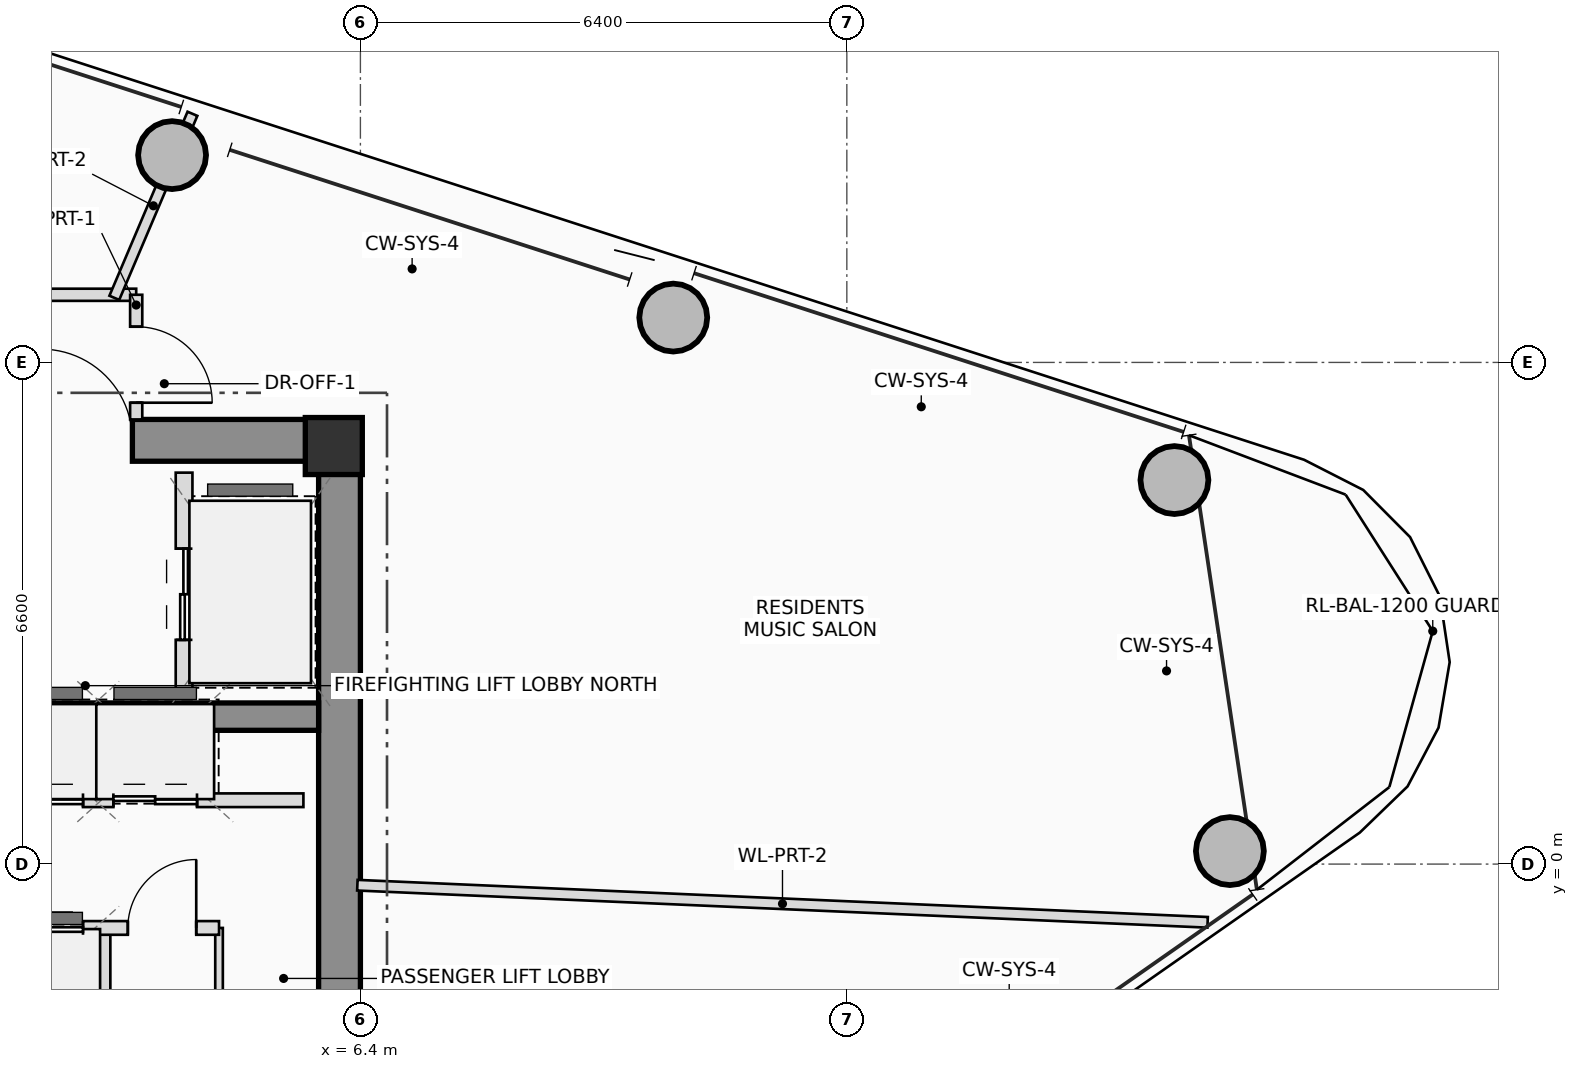
"""IFC4 building model, lengths in metres.
Left out: names, types, materials, properties, quantities, classifications, styles, units other than length and angle.
Written with IfcOpenShell. Run it as: python <this file> out.ifc"""

import sys

from ifc_helpers import new_model, si_unit, direction, frame, frame_2d, origin, origin_2d, place, context, subcontext, project, spatial, rectangle, hollow_circle, extrude, source, transform, mapped, element, fill, save


model = new_model("IFC4")
c1 = context("Model", 3, precision=1e-05, world=origin(), true_north=direction((0.0, 1.0)))
c2 = subcontext(c1, "Body", "Model", "MODEL_VIEW")
j1 = project(units=[si_unit("LENGTHUNIT", "METRE"), si_unit("PLANEANGLEUNIT", "RADIAN")], contexts=[c1])
p1 = place(None, origin())
s1 = spatial("IfcSite", under=j1, at=p1, CompositionType="ELEMENT")
p2 = place(p1, origin())
s2 = spatial("IfcBuilding", under=s1, at=p2, CompositionType="ELEMENT")
p3 = place(p2, frame((0.0, 0.0, 274.55)))
s3 = spatial("IfcBuildingStorey", under=s2, at=p3, CompositionType="ELEMENT", Elevation=274.55)
m1 = source(origin(), c2, "Body", "SweptSolid", [
    extrude(rectangle(XDim=0.75, YDim=0.75, at=origin_2d()), origin(), (0.0, 0.0, 1.0), 3.4),
])
p4 = place(p3, frame((6.05, 5.5, 0.0), z_axis=(0.0, 0.0, 1.0), x_axis=(1.0, 0.0, 0.0)))
e1 = element("IfcColumn", 1, at=p4, inside=s3, PredefinedType="COLUMN", context=c2, shape_type="MappedRepresentation", body=[
    mapped(m1, transform((0.0, 0.0, 0.0), scale=1.0)),
])
p5 = place(p3, frame((-6.4, 5.575, 0.0), z_axis=(0.0, 0.0, 1.0), x_axis=(1.0, 0.0, 0.0)))
e2 = element("IfcWall", 2, at=p5, inside=s3, PredefinedType="SHEAR", context=c2, shape_type="SweptSolid", body=[
    extrude(rectangle(XDim=12.8, YDim=0.55, at=frame_2d((6.4, 0.0))), origin(), (0.0, 0.0, 1.0), 3.4),
])
p6 = place(p5, frame((8.6, 0.0, 0.0)))
e3 = element("IfcOpeningElement", 3, at=p6, cuts=e2, PredefinedType="OPENING", context=c2, shape_type="SweptSolid", body=[
    extrude(rectangle(XDim=1.2, YDim=2.2, at=frame_2d((0.6, 1.1))), frame((0.0, 0.285, 0.0), z_axis=(0.0, -1.0, 0.0), x_axis=(1.0, 0.0, 0.0)), (0.0, 0.0, 1.0), 0.57),
])
p7 = place(p3, frame((6.125, -5.3, 0.0), z_axis=(0.0, 0.0, 1.0), x_axis=(0.0, 1.0, 0.0)))
e4 = element("IfcWall", 4, at=p7, inside=s3, PredefinedType="SHEAR", context=c2, shape_type="SweptSolid", body=[
    extrude(rectangle(XDim=10.6, YDim=0.55, at=frame_2d((5.3, 0.0))), origin(), (0.0, 0.0, 1.0), 3.4),
])
p8 = place(p3, frame((-5.85, 1.94, 0.0), z_axis=(0.0, 0.0, 1.0), x_axis=(1.0, 0.0, 0.0)))
e5 = element("IfcWall", 5, at=p8, inside=s3, PredefinedType="SHEAR", context=c2, shape_type="SweptSolid", body=[
    extrude(rectangle(XDim=11.7, YDim=0.36, at=frame_2d((5.85, 0.0))), origin(), (0.0, 0.0, 1.0), 3.4),
])
m2 = source(origin(), c2, "Body", "SweptSolid", [
    extrude(hollow_circle(Radius=0.45, WallThickness=0.032, at=origin_2d()), origin(), (0.0, 0.0, 1.0), 3.4),
])
for number, where, z_axis, x_axis in (
    (6, (17.84, 0.171, 0.0), (0.0, 0.0, 1.0), (1.0, 0.0, 0.0)),
    (7, (17.11, 5.052, 0.0), (0.0, 0.0, 1.0), (1.0, 0.0, 0.0)),
    (8, (10.516, 7.19, 0.0), (0.0, 0.0, 1.0), (1.0, 0.0, 0.0)),
    (9, (3.922, 9.327, 0.0), (0.0, 0.0, 1.0), (1.0, 0.0, 0.0)),
):
    element("IfcColumn", number, at=place(p3, frame(where, z_axis=z_axis, x_axis=x_axis)), inside=s3, PredefinedType="COLUMN", context=c2, shape_type="MappedRepresentation", body=[
        mapped(m2, transform((0.0, 0.0, 0.0), scale=1.0)),
    ])
p9 = place(p3, frame((4.08, 2.2, 0.0), z_axis=(0.0, 0.0, 1.0), x_axis=(0.0, 1.0, 0.0)))
e10 = element("IfcWall", 10, at=p9, inside=s3, PredefinedType="PLUMBINGWALL", context=c2, shape_type="SweptSolid", body=[
    extrude(rectangle(XDim=2.95, YDim=0.22, at=frame_2d((1.475, 0.0))), origin(), (0.0, 0.0, 1.0), 3.2),
])
p10 = place(p9, frame((0.75, 0.0, 0.0)))
e11 = element("IfcOpeningElement", 11, at=p10, cuts=e10, PredefinedType="OPENING", context=c2, shape_type="SweptSolid", body=[
    extrude(rectangle(XDim=1.2, YDim=2.25, at=frame_2d((0.6, 1.125))), frame((0.0, 0.12, 0.0), z_axis=(0.0, -1.0, 0.0), x_axis=(1.0, 0.0, 0.0)), (0.0, 0.0, 1.0), 0.24),
])
for number, where, z_axis, x_axis in (
    (12, (3.02, 0.84, 0.0), (0.0, 0.0, 1.0), (0.0, 1.0, 0.0)),
    (13, (4.38, 0.84, 0.0), (0.0, 0.0, 1.0), (0.0, 1.0, 0.0)),
    (14, (3.02, -1.82, 0.0), (0.0, 0.0, 1.0), (0.0, 1.0, 0.0)),
):
    element("IfcWall", number, at=place(p3, frame(where, z_axis=z_axis, x_axis=x_axis)), inside=s3, PredefinedType="PLUMBINGWALL", context=c2, shape_type="SweptSolid", body=[
        extrude(rectangle(XDim=0.98, YDim=0.18, at=frame_2d((0.49, 0.0))), origin(), (0.0, 0.0, 1.0), 3.2),
    ])
p11 = place(p3, frame((4.54, -1.82, 0.0), z_axis=(0.0, 0.0, 1.0), x_axis=(0.0, 1.0, 0.0)))
e15 = element("IfcWall", 15, at=p11, inside=s3, PredefinedType="PARTITIONING", context=c2, shape_type="SweptSolid", body=[
    extrude(rectangle(XDim=0.98, YDim=0.1, at=frame_2d((0.49, 0.0))), origin(), (0.0, 0.0, 1.0), 3.2),
])
p12 = place(p3, frame((-5.68, 0.84, 0.0), z_axis=(0.0, 0.0, 1.0), x_axis=(1.0, 0.0, 0.0)))
e16 = element("IfcWall", 16, at=p12, inside=s3, PredefinedType="PLUMBINGWALL", context=c2, shape_type="SweptSolid", body=[
    extrude(rectangle(XDim=11.33, YDim=0.18, at=frame_2d((5.665, 0.0))), origin(), (0.0, 0.0, 1.0), 3.2),
])
p13 = place(p12, frame((3.13, 0.0, 0.0)))
e17 = element("IfcOpeningElement", 17, at=p13, cuts=e16, PredefinedType="OPENING", context=c2, shape_type="SweptSolid", body=[
    extrude(rectangle(XDim=0.9, YDim=2.05, at=frame_2d((0.45, 1.025))), frame((0.0, 0.1, 0.0), z_axis=(0.0, -1.0, 0.0), x_axis=(1.0, 0.0, 0.0)), (0.0, 0.0, 1.0), 0.2),
])
p14 = place(p12, frame((7.33, 0.0, 0.0)))
e18 = element("IfcOpeningElement", 18, at=p14, cuts=e16, PredefinedType="OPENING", context=c2, shape_type="SweptSolid", body=[
    extrude(rectangle(XDim=1.1, YDim=2.2, at=frame_2d((0.55, 1.1))), frame((0.0, 0.1, 0.0), z_axis=(0.0, -1.0, 0.0), x_axis=(1.0, 0.0, 0.0)), (0.0, 0.0, 1.0), 0.2),
])
p15 = place(p12, frame((8.83, 0.0, 0.0)))
e19 = element("IfcOpeningElement", 19, at=p15, cuts=e16, PredefinedType="OPENING", context=c2, shape_type="SweptSolid", body=[
    extrude(rectangle(XDim=1.1, YDim=2.2, at=frame_2d((0.55, 1.1))), frame((0.0, 0.1, 0.0), z_axis=(0.0, -1.0, 0.0), x_axis=(1.0, 0.0, 0.0)), (0.0, 0.0, 1.0), 0.2),
])
p16 = place(p3, frame((-5.68, -0.84, 0.0), z_axis=(0.0, 0.0, 1.0), x_axis=(1.0, 0.0, 0.0)))
e20 = element("IfcWall", 20, at=p16, inside=s3, PredefinedType="PLUMBINGWALL", context=c2, shape_type="SweptSolid", body=[
    extrude(rectangle(XDim=10.22, YDim=0.18, at=frame_2d((5.11, 0.0))), origin(), (0.0, 0.0, 1.0), 3.2),
])
p17 = place(p16, frame((1.88, 0.0, 0.0)))
e21 = element("IfcOpeningElement", 21, at=p17, cuts=e20, PredefinedType="OPENING", context=c2, shape_type="SweptSolid", body=[
    extrude(rectangle(XDim=0.9, YDim=2.05, at=frame_2d((0.45, 1.025))), frame((0.0, 0.1, 0.0), z_axis=(0.0, -1.0, 0.0), x_axis=(1.0, 0.0, 0.0)), (0.0, 0.0, 1.0), 0.2),
])
p18 = place(p16, frame((5.35, 0.0, 0.0)))
e22 = element("IfcOpeningElement", 22, at=p18, cuts=e20, PredefinedType="OPENING", context=c2, shape_type="SweptSolid", body=[
    extrude(rectangle(XDim=0.9, YDim=2.05, at=frame_2d((0.45, 1.025))), frame((0.0, 0.1, 0.0), z_axis=(0.0, -1.0, 0.0), x_axis=(1.0, 0.0, 0.0)), (0.0, 0.0, 1.0), 0.2),
])
p19 = place(p16, frame((7.33, 0.0, 0.0)))
e23 = element("IfcOpeningElement", 23, at=p19, cuts=e20, PredefinedType="OPENING", context=c2, shape_type="SweptSolid", body=[
    extrude(rectangle(XDim=1.1, YDim=2.2, at=frame_2d((0.55, 1.1))), frame((0.0, 0.1, 0.0), z_axis=(0.0, -1.0, 0.0), x_axis=(1.0, 0.0, 0.0)), (0.0, 0.0, 1.0), 0.2),
])
p20 = place(p16, frame((9.02, 0.0, 0.0)))
e24 = element("IfcOpeningElement", 24, at=p20, cuts=e20, PredefinedType="OPENING", context=c2, shape_type="SweptSolid", body=[
    extrude(rectangle(XDim=0.9, YDim=2.05, at=frame_2d((0.45, 1.025))), frame((0.0, 0.1, 0.0), z_axis=(0.0, -1.0, 0.0), x_axis=(1.0, 0.0, 0.0)), (0.0, 0.0, 1.0), 0.2),
])
p21 = place(p3, frame((-6.36, 7.49, 0.0), z_axis=(0.0, 0.0, 1.0), x_axis=(1.0, 0.0, 0.0)))
e25 = element("IfcWall", 25, at=p21, inside=s3, PredefinedType="PARTITIONING", context=c2, shape_type="SweptSolid", body=[
    extrude(rectangle(XDim=9.81, YDim=0.16, at=frame_2d((4.905, 0.0))), origin(), (0.0, 0.0, 1.0), 2.605),
])
p22 = place(p21, frame((5.385, 0.0, 0.0)))
e26 = element("IfcOpeningElement", 26, at=p22, cuts=e25, PredefinedType="OPENING", context=c2, shape_type="SweptSolid", body=[
    extrude(rectangle(XDim=1.0, YDim=2.25, at=frame_2d((0.5, 1.125))), frame((0.0, 0.09, 0.0), z_axis=(0.0, -1.0, 0.0), x_axis=(1.0, 0.0, 0.0)), (0.0, 0.0, 1.0), 0.18),
])
p23 = place(p3, frame((3.45, 7.49, 0.0), z_axis=(0.0, 0.0, 1.0), x_axis=(0.0, -1.0, 0.0)))
e27 = element("IfcWall", 27, at=p23, inside=s3, PredefinedType="PARTITIONING", context=c2, shape_type="SweptSolid", body=[
    extrude(rectangle(XDim=1.64, YDim=0.16, at=frame_2d((0.82, 0.0))), origin(), (0.0, 0.0, 1.0), 2.805),
])
p24 = place(p23, frame((0.42, 0.0, 0.0)))
e28 = element("IfcOpeningElement", 28, at=p24, cuts=e27, PredefinedType="OPENING", context=c2, shape_type="SweptSolid", body=[
    extrude(rectangle(XDim=1.0, YDim=2.25, at=frame_2d((0.5, 1.125))), frame((0.0, 0.09, 0.0), z_axis=(0.0, -1.0, 0.0), x_axis=(1.0, 0.0, 0.0)), (0.0, 0.0, 1.0), 0.18),
])
p25 = place(p3, frame((6.36, -0.278, 0.0), z_axis=(0.0, 0.0, 1.0), x_axis=(0.999047788643, -0.043629302162, 0.0)))
e29 = element("IfcWall", 29, at=p25, inside=s3, PredefinedType="PARTITIONING", context=c2, shape_type="SweptSolid", body=[
    extrude(rectangle(XDim=11.197, YDim=0.14, at=frame_2d((5.599, 0.0))), origin(), (0.0, 0.0, 1.0), 2.765),
])
p26 = place(p3, frame((3.162, 7.45, 0.0), z_axis=(0.0, 0.0, 1.0), x_axis=(0.390769134848, 0.920488719784, 0.0)))
e30 = element("IfcWall", 30, at=p26, inside=s3, PredefinedType="PARTITIONING", context=c2, shape_type="SweptSolid", body=[
    extrude(rectangle(XDim=2.63, YDim=0.14, at=frame_2d((1.315, 0.0))), origin(), (0.0, 0.0, 1.0), 2.805),
])
p27 = place(p6, origin())
e31 = element("IfcDoor", 31, at=p27, inside=s3, OperationType="SINGLE_SWING_LEFT", PredefinedType="DOOR", context=c2, shape_type="SweptSolid", body=[
    extrude(rectangle(XDim=1.2, YDim=2.2, at=frame_2d((0.6, 1.1))), frame((0.0, 0.025, 0.0), z_axis=(0.0, -1.0, 0.0), x_axis=(1.0, 0.0, 0.0)), (0.0, 0.0, 1.0), 0.05),
])
fill(e3, e31)
p28 = place(p10, origin())
e32 = element("IfcDoor", 32, at=p28, inside=s3, OperationType="DOUBLE_DOOR_SLIDING", PredefinedType="DOOR", context=c2, shape_type="SweptSolid", body=[
    extrude(rectangle(XDim=1.2, YDim=2.25, at=frame_2d((0.6, 1.125))), frame((0.0, 0.025, 0.0), z_axis=(0.0, -1.0, 0.0), x_axis=(1.0, 0.0, 0.0)), (0.0, 0.0, 1.0), 0.05),
])
fill(e11, e32)
p29 = place(p14, origin())
e33 = element("IfcDoor", 33, at=p29, inside=s3, OperationType="DOUBLE_DOOR_SLIDING", PredefinedType="DOOR", context=c2, shape_type="SweptSolid", body=[
    extrude(rectangle(XDim=1.1, YDim=2.2, at=frame_2d((0.55, 1.1))), frame((0.0, 0.025, 0.0), z_axis=(0.0, -1.0, 0.0), x_axis=(1.0, 0.0, 0.0)), (0.0, 0.0, 1.0), 0.05),
])
fill(e18, e33)
p30 = place(p15, origin())
e34 = element("IfcDoor", 34, at=p30, inside=s3, OperationType="DOUBLE_DOOR_SLIDING", PredefinedType="DOOR", context=c2, shape_type="SweptSolid", body=[
    extrude(rectangle(XDim=1.1, YDim=2.2, at=frame_2d((0.55, 1.1))), frame((0.0, 0.025, 0.0), z_axis=(0.0, -1.0, 0.0), x_axis=(1.0, 0.0, 0.0)), (0.0, 0.0, 1.0), 0.05),
])
fill(e19, e34)
p31 = place(p19, origin())
e35 = element("IfcDoor", 35, at=p31, inside=s3, OperationType="DOUBLE_DOOR_SLIDING", PredefinedType="DOOR", context=c2, shape_type="SweptSolid", body=[
    extrude(rectangle(XDim=1.1, YDim=2.2, at=frame_2d((0.55, 1.1))), frame((0.0, 0.025, 0.0), z_axis=(0.0, -1.0, 0.0), x_axis=(1.0, 0.0, 0.0)), (0.0, 0.0, 1.0), 0.05),
])
fill(e23, e35)
p32 = place(p20, origin())
e36 = element("IfcDoor", 36, at=p32, inside=s3, OperationType="SINGLE_SWING_RIGHT", PredefinedType="DOOR", context=c2, shape_type="SweptSolid", body=[
    extrude(rectangle(XDim=0.9, YDim=2.05, at=frame_2d((0.45, 1.025))), frame((0.0, 0.025, 0.0), z_axis=(0.0, -1.0, 0.0), x_axis=(1.0, 0.0, 0.0)), (0.0, 0.0, 1.0), 0.05),
])
fill(e24, e36)
p33 = place(p24, origin())
e37 = element("IfcDoor", 37, at=p33, inside=s3, OperationType="SINGLE_SWING_RIGHT", PredefinedType="DOOR", context=c2, shape_type="SweptSolid", body=[
    extrude(rectangle(XDim=1.0, YDim=2.25, at=frame_2d((0.5, 1.125))), frame((0.0, 0.025, 0.0), z_axis=(0.0, -1.0, 0.0), x_axis=(1.0, 0.0, 0.0)), (0.0, 0.0, 1.0), 0.05),
])
fill(e28, e37)
save(model, sys.argv[1])
